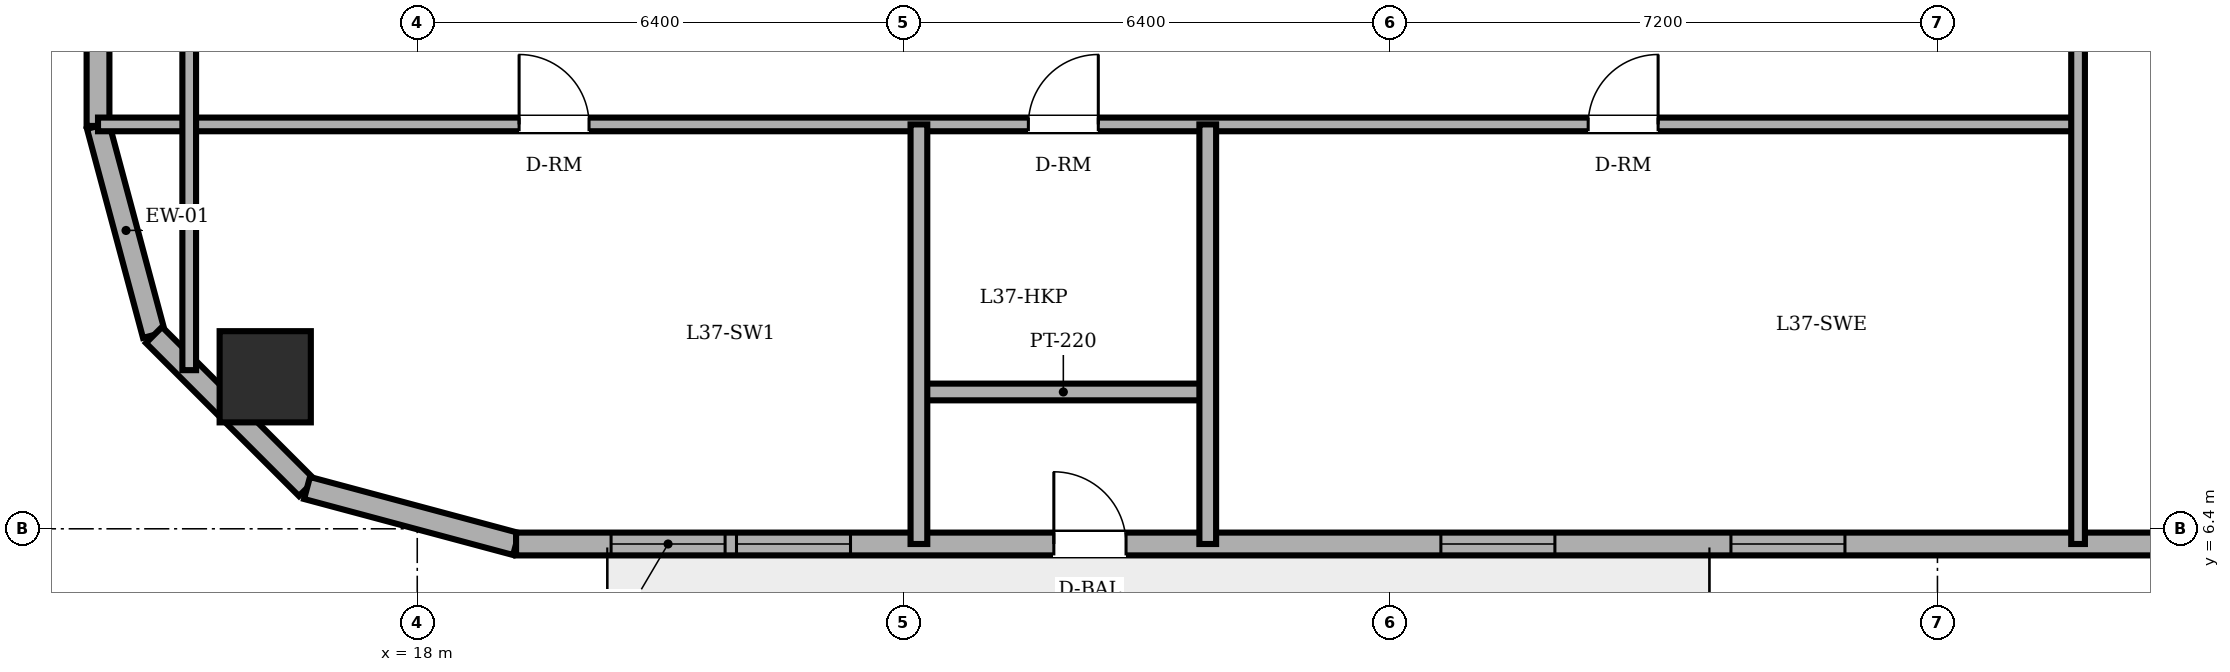
"""IFC4 building model, lengths in metres.
Left out: names, types, materials, properties, quantities, classifications, styles, units other than length and angle.
Written with IfcOpenShell. Run it as: python <this file> out.ifc"""

import sys

from ifc_helpers import new_model, si_unit, direction, frame, frame_2d, origin, origin_2d, place, context, subcontext, project, spatial, rectangle, circle, extrude, element, fill, save


model = new_model("IFC4")
c1 = context("Model", 3, precision=1e-05, world=origin(), true_north=direction((0.0, 1.0)))
c2 = subcontext(c1, "Body", "Model", "MODEL_VIEW")
j1 = project(units=[si_unit("LENGTHUNIT", "METRE"), si_unit("PLANEANGLEUNIT", "RADIAN")], contexts=[c1])
p1 = place(None, origin())
s1 = spatial("IfcSite", under=j1, at=p1, CompositionType="ELEMENT")
p2 = place(p1, origin())
s2 = spatial("IfcBuilding", under=s1, at=p2, CompositionType="ELEMENT")
p3 = place(p2, frame((0.0, 0.0, 143.8)))
s3 = spatial("IfcBuildingStorey", under=s2, at=p3, CompositionType="ELEMENT", Elevation=143.8)
p4 = place(p3, frame((16.0, 8.4, 0.0), z_axis=(0.0, 0.0, 1.0), x_axis=(1.0, 0.0, 0.0)))
e1 = element("IfcColumn", 1, at=p4, inside=s3, PredefinedType="COLUMN", context=c2, shape_type="SweptSolid", body=[
    extrude(circle(Radius=0.6, at=origin_2d()), origin(), (0.0, 0.0, 1.0), 3.6),
])
p5 = place(p3, frame((13.8, 11.7, 0.0), z_axis=(0.0, 0.0, 1.0), x_axis=(0.258884674387, -0.965908238586, 0.0)))
e2 = element("IfcWall", 2, at=p5, inside=s3, PredefinedType="SOLIDWALL", context=c2, shape_type="SweptSolid", body=[
    extrude(rectangle(XDim=2.847, YDim=0.3, at=frame_2d((1.424, 0.0))), origin(), (0.0, 0.0, 1.0), 3.4),
])
p6 = place(p3, frame((14.537, 8.95, 0.0), z_axis=(0.0, 0.0, 1.0), x_axis=(0.707106781187, -0.707106781187, 0.0)))
e3 = element("IfcWall", 3, at=p6, inside=s3, PredefinedType="SOLIDWALL", context=c2, shape_type="SweptSolid", body=[
    extrude(rectangle(XDim=2.847, YDim=0.3, at=frame_2d((1.423, 0.0))), origin(), (0.0, 0.0, 1.0), 3.4),
])
p7 = place(p3, frame((16.55, 6.937, 0.0), z_axis=(0.0, 0.0, 1.0), x_axis=(0.965908238586, -0.258884674387, 0.0)))
e4 = element("IfcWall", 4, at=p7, inside=s3, PredefinedType="SOLIDWALL", context=c2, shape_type="SweptSolid", body=[
    extrude(rectangle(XDim=2.847, YDim=0.3, at=frame_2d((1.424, 0.0))), origin(), (0.0, 0.0, 1.0), 3.4),
])
p8 = place(p3, frame((19.3, 6.2, 0.0), z_axis=(0.0, 0.0, 1.0), x_axis=(1.0, 0.0, 0.0)))
e5 = element("IfcWall", 5, at=p8, inside=s3, PredefinedType="SOLIDWALL", context=c2, shape_type="SweptSolid", body=[
    extrude(rectangle(XDim=30.282, YDim=0.3, at=frame_2d((15.141, 0.0))), origin(), (0.0, 0.0, 1.0), 3.4),
])
p9 = place(p8, frame((7.075, 0.0, 0.0)))
e6 = element("IfcOpeningElement", 6, at=p9, cuts=e5, PredefinedType="OPENING", context=c2, shape_type="SweptSolid", body=[
    extrude(rectangle(XDim=0.95, YDim=2.2, at=frame_2d((0.475, 1.1))), frame((0.0, 0.16, 0.0), z_axis=(0.0, -1.0, 0.0), x_axis=(1.0, 0.0, 0.0)), (0.0, 0.0, 1.0), 0.32),
])
p10 = place(p8, frame((1.25, 0.0, 0.85)))
e7 = element("IfcOpeningElement", 7, at=p10, cuts=e5, PredefinedType="OPENING", context=c2, shape_type="SweptSolid", body=[
    extrude(rectangle(XDim=1.5, YDim=1.55, at=frame_2d((0.75, 0.775))), frame((0.0, 0.16, 0.0), z_axis=(0.0, -1.0, 0.0), x_axis=(1.0, 0.0, 0.0)), (0.0, 0.0, 1.0), 0.32),
])
p11 = place(p8, frame((2.9, 0.0, 0.85)))
e8 = element("IfcOpeningElement", 8, at=p11, cuts=e5, PredefinedType="OPENING", context=c2, shape_type="SweptSolid", body=[
    extrude(rectangle(XDim=1.5, YDim=1.55, at=frame_2d((0.75, 0.775))), frame((0.0, 0.16, 0.0), z_axis=(0.0, -1.0, 0.0), x_axis=(1.0, 0.0, 0.0)), (0.0, 0.0, 1.0), 0.32),
])
p12 = place(p8, frame((12.167, 0.0, 0.85)))
e9 = element("IfcOpeningElement", 9, at=p12, cuts=e5, PredefinedType="OPENING", context=c2, shape_type="SweptSolid", body=[
    extrude(rectangle(XDim=1.5, YDim=1.55, at=frame_2d((0.75, 0.775))), frame((0.0, 0.16, 0.0), z_axis=(0.0, -1.0, 0.0), x_axis=(1.0, 0.0, 0.0)), (0.0, 0.0, 1.0), 0.32),
])
p13 = place(p8, frame((15.983, 0.0, 0.85)))
e10 = element("IfcOpeningElement", 10, at=p13, cuts=e5, PredefinedType="OPENING", context=c2, shape_type="SweptSolid", body=[
    extrude(rectangle(XDim=1.5, YDim=1.55, at=frame_2d((0.75, 0.775))), frame((0.0, 0.16, 0.0), z_axis=(0.0, -1.0, 0.0), x_axis=(1.0, 0.0, 0.0)), (0.0, 0.0, 1.0), 0.32),
])
p14 = place(p8, frame((22.484, 0.0, 0.85)))
e11 = element("IfcOpeningElement", 11, at=p14, cuts=e5, PredefinedType="OPENING", context=c2, shape_type="SweptSolid", body=[
    extrude(rectangle(XDim=1.5, YDim=1.55, at=frame_2d((0.75, 0.775))), frame((0.0, 0.16, 0.0), z_axis=(0.0, -1.0, 0.0), x_axis=(1.0, 0.0, 0.0)), (0.0, 0.0, 1.0), 0.32),
])
p15 = place(p8, frame((25.168, 0.0, 0.85)))
e12 = element("IfcOpeningElement", 12, at=p15, cuts=e5, PredefinedType="OPENING", context=c2, shape_type="SweptSolid", body=[
    extrude(rectangle(XDim=1.5, YDim=1.55, at=frame_2d((0.75, 0.775))), frame((0.0, 0.16, 0.0), z_axis=(0.0, -1.0, 0.0), x_axis=(1.0, 0.0, 0.0)), (0.0, 0.0, 1.0), 0.32),
])
p16 = place(p8, frame((28.773, 0.0, 0.85)))
e13 = element("IfcOpeningElement", 13, at=p16, cuts=e5, PredefinedType="OPENING", context=c2, shape_type="SweptSolid", body=[
    extrude(rectangle(XDim=1.05, YDim=1.55, at=frame_2d((0.525, 0.775))), frame((0.0, 0.16, 0.0), z_axis=(0.0, -1.0, 0.0), x_axis=(1.0, 0.0, 0.0)), (0.0, 0.0, 1.0), 0.32),
])
p17 = place(p3, frame((13.8, 36.3, 0.0), z_axis=(0.0, 0.0, 1.0), x_axis=(0.0, -1.0, 0.0)))
e14 = element("IfcWall", 14, at=p17, inside=s3, PredefinedType="SOLIDWALL", context=c2, shape_type="SweptSolid", body=[
    extrude(rectangle(XDim=24.6, YDim=0.3, at=frame_2d((12.3, 0.0))), origin(), (0.0, 0.0, 1.0), 3.4),
])
p18 = place(p17, frame((5.003, 0.0, 0.85)))
e15 = element("IfcOpeningElement", 15, at=p18, cuts=e14, PredefinedType="OPENING", context=c2, shape_type="SweptSolid", body=[
    extrude(rectangle(XDim=1.5, YDim=1.55, at=frame_2d((0.75, 0.775))), frame((0.0, 0.16, 0.0), z_axis=(0.0, -1.0, 0.0), x_axis=(1.0, 0.0, 0.0)), (0.0, 0.0, 1.0), 0.32),
])
p19 = place(p17, frame((8.277, 0.0, 0.85)))
e16 = element("IfcOpeningElement", 16, at=p19, cuts=e14, PredefinedType="OPENING", context=c2, shape_type="SweptSolid", body=[
    extrude(rectangle(XDim=1.5, YDim=1.55, at=frame_2d((0.75, 0.775))), frame((0.0, 0.16, 0.0), z_axis=(0.0, -1.0, 0.0), x_axis=(1.0, 0.0, 0.0)), (0.0, 0.0, 1.0), 0.32),
])
p20 = place(p17, frame((14.823, 0.0, 0.85)))
e17 = element("IfcOpeningElement", 17, at=p20, cuts=e14, PredefinedType="OPENING", context=c2, shape_type="SweptSolid", body=[
    extrude(rectangle(XDim=1.5, YDim=1.55, at=frame_2d((0.75, 0.775))), frame((0.0, 0.16, 0.0), z_axis=(0.0, -1.0, 0.0), x_axis=(1.0, 0.0, 0.0)), (0.0, 0.0, 1.0), 0.32),
])
p21 = place(p17, frame((18.097, 0.0, 0.85)))
e18 = element("IfcOpeningElement", 18, at=p21, cuts=e14, PredefinedType="OPENING", context=c2, shape_type="SweptSolid", body=[
    extrude(rectangle(XDim=1.5, YDim=1.55, at=frame_2d((0.75, 0.775))), frame((0.0, 0.16, 0.0), z_axis=(0.0, -1.0, 0.0), x_axis=(1.0, 0.0, 0.0)), (0.0, 0.0, 1.0), 0.32),
])
p22 = place(p3, frame((24.6, 8.2, 0.0), z_axis=(0.0, 0.0, 1.0), x_axis=(1.0, 0.0, 0.0)))
e19 = element("IfcWall", 19, at=p22, inside=s3, PredefinedType="PARTITIONING", context=c2, shape_type="SweptSolid", body=[
    extrude(rectangle(XDim=3.8, YDim=0.22, at=frame_2d((1.9, 0.0))), origin(), (0.0, 0.0, 1.0), 2.882),
])
p23 = place(p3, frame((13.8, 11.72, 0.0), z_axis=(0.0, 0.0, 1.0), x_axis=(1.0, 0.0, 0.0)))
e20 = element("IfcWall", 20, at=p23, inside=s3, PredefinedType="PARTITIONING", context=c2, shape_type="SweptSolid", body=[
    extrude(rectangle(XDim=26.05, YDim=0.18, at=frame_2d((13.025, 0.0))), origin(), (0.0, 0.0, 1.0), 3.4),
])
p24 = place(p23, frame((12.24, 0.0, 0.0)))
e21 = element("IfcOpeningElement", 21, at=p24, cuts=e20, PredefinedType="OPENING", context=c2, shape_type="SweptSolid", body=[
    extrude(rectangle(XDim=0.92, YDim=2.1, at=frame_2d((0.46, 1.05))), frame((0.0, 0.1, 0.0), z_axis=(0.0, -1.0, 0.0), x_axis=(1.0, 0.0, 0.0)), (0.0, 0.0, 1.0), 0.2),
])
p25 = place(p23, frame((5.54, 0.0, 0.0)))
e22 = element("IfcOpeningElement", 22, at=p25, cuts=e20, PredefinedType="OPENING", context=c2, shape_type="SweptSolid", body=[
    extrude(rectangle(XDim=0.92, YDim=2.1, at=frame_2d((0.46, 1.05))), frame((0.0, 0.1, 0.0), z_axis=(0.0, -1.0, 0.0), x_axis=(1.0, 0.0, 0.0)), (0.0, 0.0, 1.0), 0.2),
])
p26 = place(p23, frame((19.605, 0.0, 0.0)))
e23 = element("IfcOpeningElement", 23, at=p26, cuts=e20, PredefinedType="OPENING", context=c2, shape_type="SweptSolid", body=[
    extrude(rectangle(XDim=0.92, YDim=2.1, at=frame_2d((0.46, 1.05))), frame((0.0, 0.1, 0.0), z_axis=(0.0, -1.0, 0.0), x_axis=(1.0, 0.0, 0.0)), (0.0, 0.0, 1.0), 0.2),
])
p27 = place(p3, frame((15.0, 8.487, 0.0), z_axis=(0.0, 0.0, 1.0), x_axis=(0.0, 1.0, 0.0)))
e24 = element("IfcWall", 24, at=p27, inside=s3, PredefinedType="PARTITIONING", context=c2, shape_type="SweptSolid", body=[
    extrude(rectangle(XDim=5.693, YDim=0.18, at=frame_2d((2.846, 0.0))), origin(), (0.0, 0.0, 1.0), 3.4),
])
for number, where, z_axis, x_axis in (
    (25, (24.6, 6.2, 0.0), (0.0, 0.0, 1.0), (0.0, 1.0, 0.0)),
    (26, (28.4, 6.2, 0.0), (0.0, 0.0, 1.0), (0.0, 1.0, 0.0)),
):
    element("IfcWall", number, at=place(p3, frame(where, z_axis=z_axis, x_axis=x_axis)), inside=s3, PredefinedType="PARTITIONING", context=c2, shape_type="SweptSolid", body=[
        extrude(rectangle(XDim=5.52, YDim=0.22, at=frame_2d((2.76, 0.0))), origin(), (0.0, 0.0, 1.0), 3.4),
    ])
p28 = place(p3, frame((39.85, 6.2, 0.0), z_axis=(0.0, 0.0, 1.0), x_axis=(0.0, 1.0, 0.0)))
e27 = element("IfcWall", 27, at=p28, inside=s3, PredefinedType="PARTITIONING", context=c2, shape_type="SweptSolid", body=[
    extrude(rectangle(XDim=16.62, YDim=0.18, at=frame_2d((8.31, 0.0))), origin(), (0.0, 0.0, 1.0), 3.4),
])
p29 = place(p28, frame((10.31, 0.0, 0.0)))
e28 = element("IfcOpeningElement", 28, at=p29, cuts=e27, PredefinedType="OPENING", context=c2, shape_type="SweptSolid", body=[
    extrude(rectangle(XDim=1.0, YDim=2.15, at=frame_2d((0.5, 1.075))), frame((0.0, 0.1, 0.0), z_axis=(0.0, -1.0, 0.0), x_axis=(1.0, 0.0, 0.0)), (0.0, 0.0, 1.0), 0.2),
])
p30 = place(p9, origin())
e29 = element("IfcDoor", 29, at=p30, inside=s3, OperationType="SINGLE_SWING_LEFT", PredefinedType="DOOR", context=c2, shape_type="SweptSolid", body=[
    extrude(rectangle(XDim=0.95, YDim=2.2, at=frame_2d((0.475, 1.1))), frame((0.0, 0.025, 0.0), z_axis=(0.0, -1.0, 0.0), x_axis=(1.0, 0.0, 0.0)), (0.0, 0.0, 1.0), 0.05),
])
fill(e6, e29)
p31 = place(p10, origin())
e30 = element("IfcWindow", 30, at=p31, inside=s3, PartitioningType="DOUBLE_PANEL_VERTICAL", PredefinedType="WINDOW", context=c2, shape_type="SweptSolid", body=[
    extrude(rectangle(XDim=1.5, YDim=1.55, at=frame_2d((0.75, 0.775))), frame((0.0, 0.03, 0.0), z_axis=(0.0, -1.0, 0.0), x_axis=(1.0, 0.0, 0.0)), (0.0, 0.0, 1.0), 0.06),
])
fill(e7, e30)
p32 = place(p11, origin())
e31 = element("IfcWindow", 31, at=p32, inside=s3, PartitioningType="DOUBLE_PANEL_VERTICAL", PredefinedType="WINDOW", context=c2, shape_type="SweptSolid", body=[
    extrude(rectangle(XDim=1.5, YDim=1.55, at=frame_2d((0.75, 0.775))), frame((0.0, 0.03, 0.0), z_axis=(0.0, -1.0, 0.0), x_axis=(1.0, 0.0, 0.0)), (0.0, 0.0, 1.0), 0.06),
])
fill(e8, e31)
p33 = place(p12, origin())
e32 = element("IfcWindow", 32, at=p33, inside=s3, PartitioningType="DOUBLE_PANEL_VERTICAL", PredefinedType="WINDOW", context=c2, shape_type="SweptSolid", body=[
    extrude(rectangle(XDim=1.5, YDim=1.55, at=frame_2d((0.75, 0.775))), frame((0.0, 0.03, 0.0), z_axis=(0.0, -1.0, 0.0), x_axis=(1.0, 0.0, 0.0)), (0.0, 0.0, 1.0), 0.06),
])
fill(e9, e32)
p34 = place(p13, origin())
e33 = element("IfcWindow", 33, at=p34, inside=s3, PartitioningType="DOUBLE_PANEL_VERTICAL", PredefinedType="WINDOW", context=c2, shape_type="SweptSolid", body=[
    extrude(rectangle(XDim=1.5, YDim=1.55, at=frame_2d((0.75, 0.775))), frame((0.0, 0.03, 0.0), z_axis=(0.0, -1.0, 0.0), x_axis=(1.0, 0.0, 0.0)), (0.0, 0.0, 1.0), 0.06),
])
fill(e10, e33)
p35 = place(p24, origin())
e34 = element("IfcDoor", 34, at=p35, inside=s3, OperationType="SINGLE_SWING_RIGHT", PredefinedType="DOOR", context=c2, shape_type="SweptSolid", body=[
    extrude(rectangle(XDim=0.92, YDim=2.1, at=frame_2d((0.46, 1.05))), frame((0.0, 0.025, 0.0), z_axis=(0.0, -1.0, 0.0), x_axis=(1.0, 0.0, 0.0)), (0.0, 0.0, 1.0), 0.05),
])
fill(e21, e34)
p36 = place(p25, origin())
e35 = element("IfcDoor", 35, at=p36, inside=s3, OperationType="SINGLE_SWING_LEFT", PredefinedType="DOOR", context=c2, shape_type="SweptSolid", body=[
    extrude(rectangle(XDim=0.92, YDim=2.1, at=frame_2d((0.46, 1.05))), frame((0.0, 0.025, 0.0), z_axis=(0.0, -1.0, 0.0), x_axis=(1.0, 0.0, 0.0)), (0.0, 0.0, 1.0), 0.05),
])
fill(e22, e35)
p37 = place(p26, origin())
e36 = element("IfcDoor", 36, at=p37, inside=s3, OperationType="SINGLE_SWING_RIGHT", PredefinedType="DOOR", context=c2, shape_type="SweptSolid", body=[
    extrude(rectangle(XDim=0.92, YDim=2.1, at=frame_2d((0.46, 1.05))), frame((0.0, 0.025, 0.0), z_axis=(0.0, -1.0, 0.0), x_axis=(1.0, 0.0, 0.0)), (0.0, 0.0, 1.0), 0.05),
])
fill(e23, e36)
save(model, sys.argv[1])
